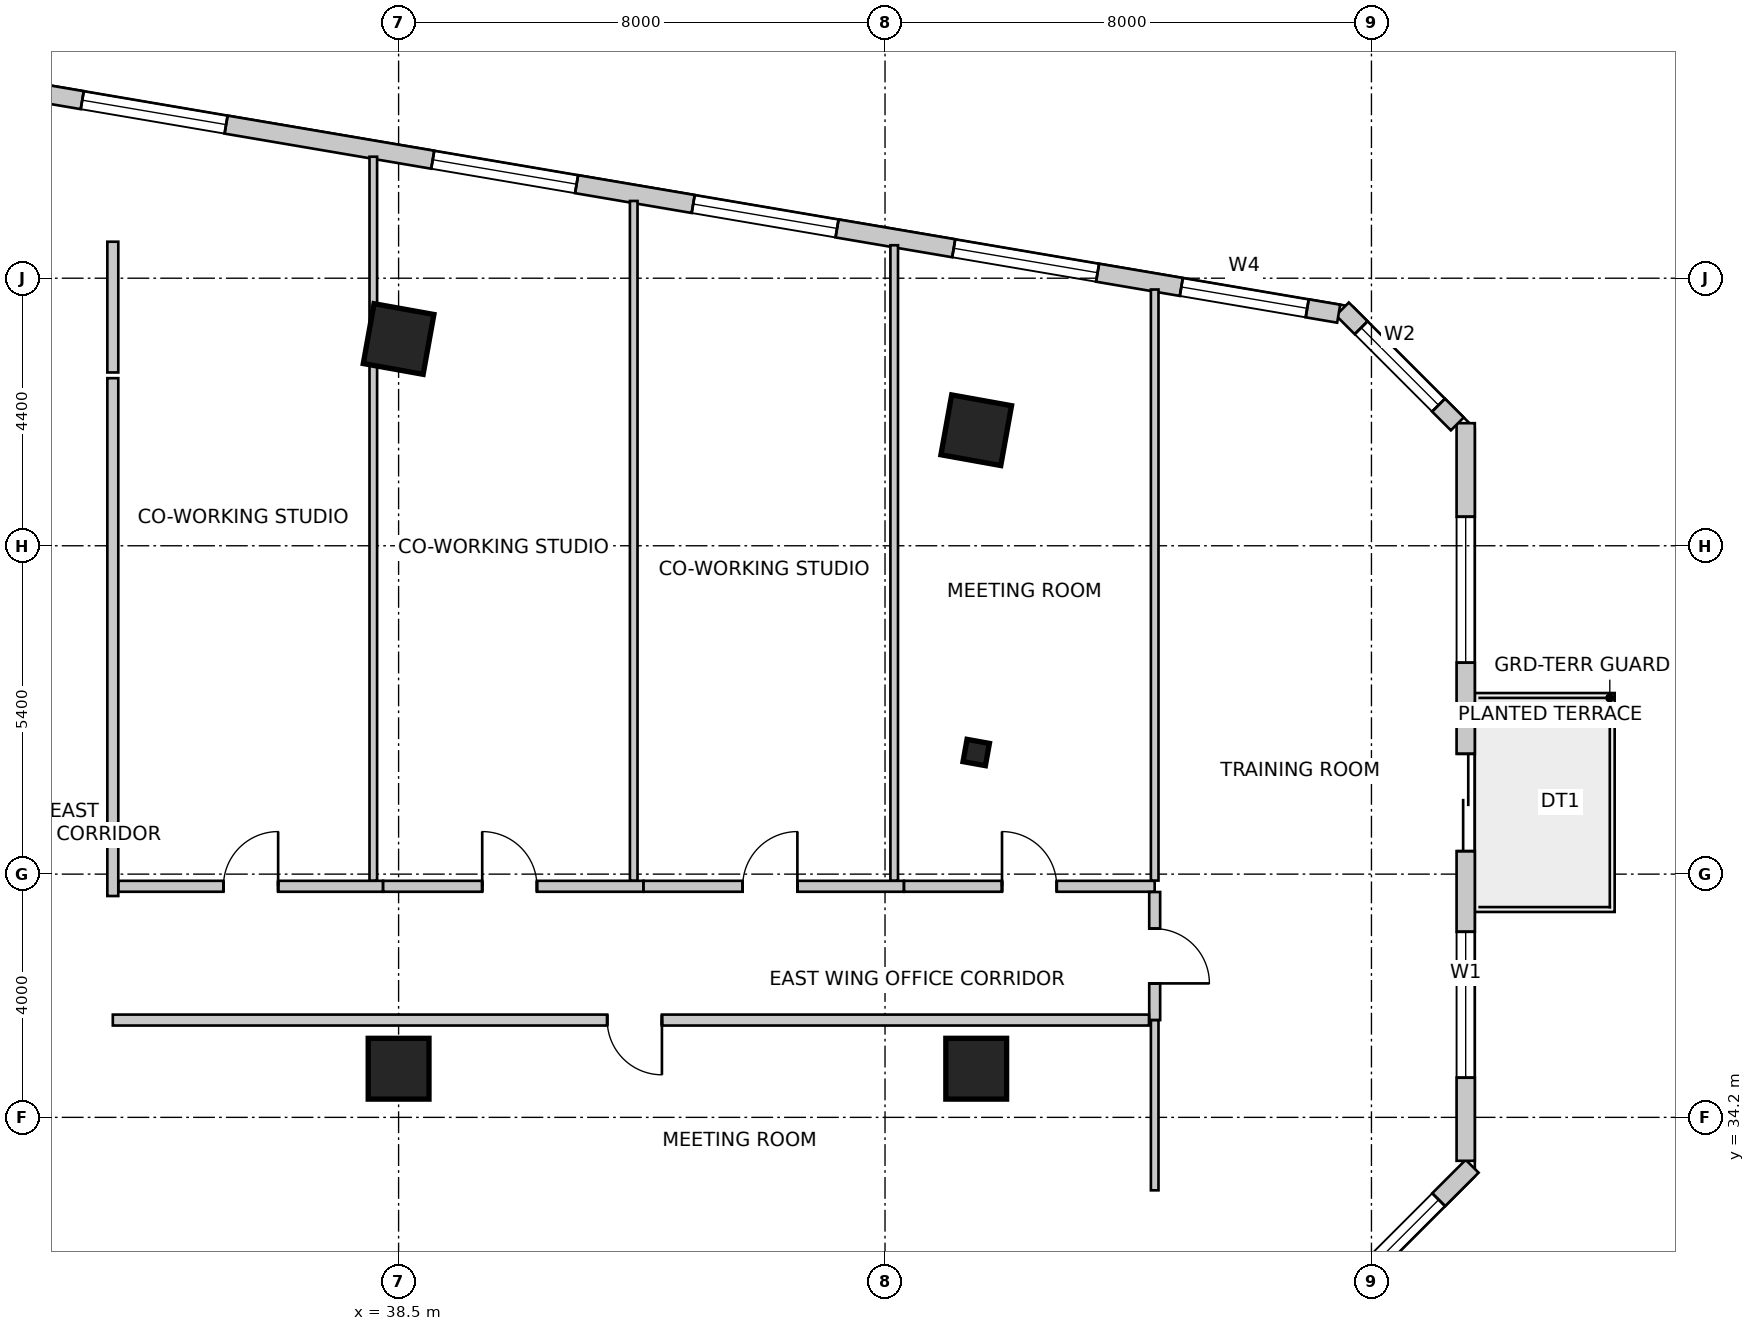
"""IFC4 building model, lengths in metres.
Left out: names, types, materials, properties, quantities, classifications, styles, units other than length and angle.
Written with IfcOpenShell. Run it as: python <this file> out.ifc"""

import sys

from ifc_helpers import new_model, si_unit, direction, frame, frame_2d, origin, origin_2d, place, context, subcontext, project, spatial, rectangle, i_section, extrude, source, transform, mapped, element, fill, save


model = new_model("IFC4")
c1 = context("Model", 3, precision=1e-05, world=origin(), true_north=direction((0.0, 1.0)))
c2 = subcontext(c1, "Body", "Model", "MODEL_VIEW")
j1 = project(units=[si_unit("LENGTHUNIT", "METRE"), si_unit("PLANEANGLEUNIT", "RADIAN")], contexts=[c1])
p1 = place(None, origin())
s1 = spatial("IfcSite", under=j1, at=p1, CompositionType="ELEMENT")
p2 = place(p1, origin())
s2 = spatial("IfcBuilding", under=s1, at=p2, CompositionType="ELEMENT")
p3 = place(p2, frame((0.0, 0.0, 79.0)))
s3 = spatial("IfcBuildingStorey", under=s2, at=p3, CompositionType="ELEMENT", Elevation=79.0)
m1 = source(origin(), c2, "Body", "SweptSolid", [
    extrude(rectangle(XDim=1.0, YDim=1.0, at=origin_2d()), origin(), (0.0, 0.0, 1.0), 4.0),
])
for number, where, z_axis, x_axis in (
    (1, (38.5, 47.0, 0.0), (0.0, 0.0, 1.0), (0.984, -0.177, 0.0)),
    (2, (48.0, 45.5, 0.0), (0.0, 0.0, 1.0), (0.984, -0.177, 0.0)),
    (3, (38.5, 35.0, 0.0), (0.0, 0.0, 1.0), (1.0, 0.0, 0.0)),
    (4, (48.0, 35.0, 0.0), (0.0, 0.0, 1.0), (1.0, 0.0, 0.0)),
):
    element("IfcColumn", number, at=place(p3, frame(where, z_axis=z_axis, x_axis=x_axis)), inside=s3, PredefinedType="COLUMN", context=c2, shape_type="MappedRepresentation", body=[
        mapped(m1, transform((0.0, 0.0, 0.0), scale=1.0)),
    ])
m2 = source(origin(), c2, "Body", "SweptSolid", [
    extrude(i_section(OverallWidth=0.374, OverallDepth=0.372, WebThickness=0.016, FlangeThickness=0.026, FilletRadius=0.015, at=origin_2d()), origin(), (0.0, 0.0, 1.0), 4.0),
])
p4 = place(p3, frame((48.0, 40.2, 0.0), z_axis=(0.0, 0.0, 1.0), x_axis=(0.984195607969, -0.17708474032, 0.0)))
e5 = element("IfcColumn", 5, at=p4, inside=s3, PredefinedType="COLUMN", context=c2, shape_type="MappedRepresentation", body=[
    mapped(m2, transform((0.0, 0.0, 0.0), scale=1.0)),
])
p5 = place(p3, frame((53.076, 30.316, 0.0), z_axis=(0.0, 0.0, 1.0), x_axis=(0.707078757535, 0.707134803727, 0.0)))
e6 = element("IfcWall", 6, at=p5, inside=s3, PredefinedType="SOLIDWALL", context=c2, shape_type="SweptSolid", body=[
    extrude(rectangle(XDim=4.356, YDim=0.3, at=frame_2d((2.178, 0.0))), origin(), (0.0, 0.0, 1.0), 3.75),
])
m3 = source(origin(), c2, "Body", "SweptSolid", [
    extrude(rectangle(XDim=2.8, YDim=2.4, at=frame_2d((1.4, 1.2))), frame((0.0, 0.16, 0.0), z_axis=(0.0, -1.0, 0.0), x_axis=(1.0, 0.0, 0.0)), (0.0, 0.0, 1.0), 0.32),
])
p6 = place(p5, frame((0.778, 0.0, 0.85)))
e7 = element("IfcOpeningElement", 7, at=p6, cuts=e6, PredefinedType="OPENING", context=c2, shape_type="MappedRepresentation", body=[
    mapped(m3, transform((0.0, 0.0, 0.0), scale=1.0)),
])
p7 = place(p3, frame((56.05, 33.485, 0.0), z_axis=(0.0, 0.0, 1.0), x_axis=(0.0, 1.0, 0.0)))
e8 = element("IfcWall", 8, at=p7, inside=s3, PredefinedType="SOLIDWALL", context=c2, shape_type="SweptSolid", body=[
    extrude(rectangle(XDim=12.131, YDim=0.3, at=frame_2d((6.065, 0.0))), origin(), (0.0, 0.0, 1.0), 3.75),
])
m4 = source(origin(), c2, "Body", "SweptSolid", [
    extrude(rectangle(XDim=1.6, YDim=2.15, at=frame_2d((0.8, 1.075))), frame((0.0, 0.16, 0.0), z_axis=(0.0, -1.0, 0.0), x_axis=(1.0, 0.0, 0.0)), (0.0, 0.0, 1.0), 0.32),
])
p8 = place(p7, frame((5.093, 0.0, 0.0)))
e9 = element("IfcOpeningElement", 9, at=p8, cuts=e8, PredefinedType="OPENING", context=c2, shape_type="MappedRepresentation", body=[
    mapped(m4, transform((0.0, 0.0, 0.0), scale=1.0)),
])
m5 = source(origin(), c2, "Body", "SweptSolid", [
    extrude(rectangle(XDim=2.4, YDim=2.2, at=frame_2d((1.2, 1.1))), frame((0.0, 0.16, 0.0), z_axis=(0.0, -1.0, 0.0), x_axis=(1.0, 0.0, 0.0)), (0.0, 0.0, 1.0), 0.32),
])
p9 = place(p7, frame((1.367, 0.0, 0.85)))
e10 = element("IfcOpeningElement", 10, at=p9, cuts=e8, PredefinedType="OPENING", context=c2, shape_type="MappedRepresentation", body=[
    mapped(m5, transform((0.0, 0.0, 0.0), scale=1.0)),
])
p10 = place(p7, frame((8.192, 0.0, 0.85)))
e11 = element("IfcOpeningElement", 11, at=p10, cuts=e8, PredefinedType="OPENING", context=c2, shape_type="MappedRepresentation", body=[
    mapped(m5, transform((0.0, 0.0, 0.0), scale=1.0)),
])
p11 = place(p3, frame((55.912, 45.604, 0.0), z_axis=(0.0, 0.0, 1.0), x_axis=(-0.707152443695, 0.707061115729, 0.0)))
e12 = element("IfcWall", 12, at=p11, inside=s3, PredefinedType="SOLIDWALL", context=c2, shape_type="SweptSolid", body=[
    extrude(rectangle(XDim=2.673, YDim=0.3, at=frame_2d((1.337, 0.0))), origin(), (0.0, 0.0, 1.0), 3.75),
])
m6 = source(origin(), c2, "Body", "SweptSolid", [
    extrude(rectangle(XDim=1.8, YDim=2.1, at=frame_2d((0.9, 1.05))), frame((0.0, 0.16, 0.0), z_axis=(0.0, -1.0, 0.0), x_axis=(1.0, 0.0, 0.0)), (0.0, 0.0, 1.0), 0.32),
])
p12 = place(p11, frame((0.437, 0.0, 0.85)))
e13 = element("IfcOpeningElement", 13, at=p12, cuts=e12, PredefinedType="OPENING", context=c2, shape_type="MappedRepresentation", body=[
    mapped(m6, transform((0.0, 0.0, 0.0), scale=1.0)),
])
p13 = place(p3, frame((53.961, 47.417, 0.0), z_axis=(0.0, 0.0, 1.0), x_axis=(-0.985865713455, 0.167537443678, 0.0)))
e14 = element("IfcWall", 14, at=p13, inside=s3, PredefinedType="SOLIDWALL", context=c2, shape_type="SweptSolid", body=[
    extrude(rectangle(XDim=32.537, YDim=0.3, at=frame_2d((16.269, 0.0))), origin(), (0.0, 0.0, 1.0), 3.75),
])
m7 = source(origin(), c2, "Body", "SweptSolid", [
    extrude(rectangle(XDim=2.1, YDim=2.0, at=frame_2d((1.05, 1.0))), frame((0.0, 0.16, 0.0), z_axis=(0.0, -1.0, 0.0), x_axis=(1.0, 0.0, 0.0)), (0.0, 0.0, 1.0), 0.32),
])
p14 = place(p13, frame((0.525, 0.0, 0.85)))
e15 = element("IfcOpeningElement", 15, at=p14, cuts=e14, PredefinedType="OPENING", context=c2, shape_type="MappedRepresentation", body=[
    mapped(m7, transform((0.0, 0.0, 0.0), scale=1.0)),
])
p15 = place(p13, frame((4.022, 0.0, 0.85)))
e16 = element("IfcOpeningElement", 16, at=p15, cuts=e14, PredefinedType="OPENING", context=c2, shape_type="MappedRepresentation", body=[
    mapped(m5, transform((0.0, 0.0, 0.0), scale=1.0)),
])
p16 = place(p13, frame((8.368, 0.0, 0.85)))
e17 = element("IfcOpeningElement", 17, at=p16, cuts=e14, PredefinedType="OPENING", context=c2, shape_type="MappedRepresentation", body=[
    mapped(m5, transform((0.0, 0.0, 0.0), scale=1.0)),
])
p17 = place(p13, frame((12.713, 0.0, 0.85)))
e18 = element("IfcOpeningElement", 18, at=p17, cuts=e14, PredefinedType="OPENING", context=c2, shape_type="MappedRepresentation", body=[
    mapped(m5, transform((0.0, 0.0, 0.0), scale=1.0)),
])
p18 = place(p13, frame((18.56, 0.0, 0.85)))
e19 = element("IfcOpeningElement", 19, at=p18, cuts=e14, PredefinedType="OPENING", context=c2, shape_type="MappedRepresentation", body=[
    mapped(m5, transform((0.0, 0.0, 0.0), scale=1.0)),
])
p19 = place(p13, frame((25.095, 0.0, 0.85)))
e20 = element("IfcOpeningElement", 20, at=p19, cuts=e14, PredefinedType="OPENING", context=c2, shape_type="MappedRepresentation", body=[
    mapped(m5, transform((0.0, 0.0, 0.0), scale=1.0)),
])
p20 = place(p13, frame((29.595, 0.0, 0.85)))
e21 = element("IfcOpeningElement", 21, at=p20, cuts=e14, PredefinedType="OPENING", context=c2, shape_type="MappedRepresentation", body=[
    mapped(m5, transform((0.0, 0.0, 0.0), scale=1.0)),
])
p21 = place(p3, frame((33.8, 48.6, 0.0), z_axis=(0.0, 0.0, 1.0), x_axis=(0.0, -1.0, 0.0)))
e22 = element("IfcWall", 22, at=p21, inside=s3, PredefinedType="PARTITIONING", context=c2, shape_type="SweptSolid", body=[
    extrude(rectangle(XDim=2.15, YDim=0.18, at=frame_2d((1.075, 0.0))), origin(), (0.0, 0.0, 1.0), 2.892),
])
p22 = place(p3, frame((33.8, 46.356, 0.0), z_axis=(0.0, 0.0, 1.0), x_axis=(0.0, -1.0, 0.0)))
e23 = element("IfcWall", 23, at=p22, inside=s3, PredefinedType="PARTITIONING", context=c2, shape_type="SweptSolid", body=[
    extrude(rectangle(XDim=8.516, YDim=0.18, at=frame_2d((4.258, 0.0))), origin(), (0.0, 0.0, 1.0), 3.279),
])
p23 = place(p3, frame((33.894, 38.0, 0.0), z_axis=(0.0, 0.0, 1.0), x_axis=(1.0, 0.0, 0.0)))
e24 = element("IfcWall", 24, at=p23, inside=s3, PredefinedType="PARTITIONING", context=c2, shape_type="SweptSolid", body=[
    extrude(rectangle(XDim=4.35, YDim=0.18, at=frame_2d((2.175, 0.0))), origin(), (0.0, 0.0, 1.0), 3.419),
])
m8 = source(origin(), c2, "Body", "SweptSolid", [
    extrude(rectangle(XDim=0.9, YDim=2.15, at=frame_2d((0.45, 1.075))), frame((0.0, 0.1, 0.0), z_axis=(0.0, -1.0, 0.0), x_axis=(1.0, 0.0, 0.0)), (0.0, 0.0, 1.0), 0.2),
])
p24 = place(p23, frame((1.725, 0.0, 0.0)))
e25 = element("IfcOpeningElement", 25, at=p24, cuts=e24, PredefinedType="OPENING", context=c2, shape_type="MappedRepresentation", body=[
    mapped(m8, transform((0.0, 0.0, 0.0), scale=1.0)),
])
p25 = place(p3, frame((38.246, 38.0, 0.0), z_axis=(0.0, 0.0, 1.0), x_axis=(1.0, 0.0, 0.0)))
e26 = element("IfcWall", 26, at=p25, inside=s3, PredefinedType="PARTITIONING", context=c2, shape_type="SweptSolid", body=[
    extrude(rectangle(XDim=4.281, YDim=0.18, at=frame_2d((2.141, 0.0))), origin(), (0.0, 0.0, 1.0), 3.125),
])
p26 = place(p25, frame((1.629, 0.0, 0.0)))
e27 = element("IfcOpeningElement", 27, at=p26, cuts=e26, PredefinedType="OPENING", context=c2, shape_type="MappedRepresentation", body=[
    mapped(m8, transform((0.0, 0.0, 0.0), scale=1.0)),
])
p27 = place(p3, frame((42.529, 38.0, 0.0), z_axis=(0.0, 0.0, 1.0), x_axis=(1.0, 0.0, 0.0)))
e28 = element("IfcWall", 28, at=p27, inside=s3, PredefinedType="PARTITIONING", context=c2, shape_type="SweptSolid", body=[
    extrude(rectangle(XDim=4.282, YDim=0.18, at=frame_2d((2.141, 0.0))), origin(), (0.0, 0.0, 1.0), 3.279),
])
p28 = place(p27, frame((1.63, 0.0, 0.0)))
e29 = element("IfcOpeningElement", 29, at=p28, cuts=e28, PredefinedType="OPENING", context=c2, shape_type="MappedRepresentation", body=[
    mapped(m8, transform((0.0, 0.0, 0.0), scale=1.0)),
])
p29 = place(p3, frame((46.813, 38.0, 0.0), z_axis=(0.0, 0.0, 1.0), x_axis=(1.0, 0.0, 0.0)))
e30 = element("IfcWall", 30, at=p29, inside=s3, PredefinedType="PARTITIONING", context=c2, shape_type="SweptSolid", body=[
    extrude(rectangle(XDim=4.122, YDim=0.18, at=frame_2d((2.061, 0.0))), origin(), (0.0, 0.0, 1.0), 3.125),
])
p30 = place(p29, frame((1.611, 0.0, 0.0)))
e31 = element("IfcOpeningElement", 31, at=p30, cuts=e30, PredefinedType="OPENING", context=c2, shape_type="MappedRepresentation", body=[
    mapped(m8, transform((0.0, 0.0, 0.0), scale=1.0)),
])
p31 = place(p3, frame((50.935, 37.906, 0.0), z_axis=(0.0, 0.0, 1.0), x_axis=(0.0, -1.0, 0.0)))
e32 = element("IfcWall", 32, at=p31, inside=s3, PredefinedType="PARTITIONING", context=c2, shape_type="SweptSolid", body=[
    extrude(rectangle(XDim=2.106, YDim=0.18, at=frame_2d((1.053, 0.0))), origin(), (0.0, 0.0, 1.0), 3.75),
])
p32 = place(p31, frame((0.603, 0.0, 0.0)))
e33 = element("IfcOpeningElement", 33, at=p32, cuts=e32, PredefinedType="OPENING", context=c2, shape_type="MappedRepresentation", body=[
    mapped(m8, transform((0.0, 0.0, 0.0), scale=1.0)),
])
p33 = place(p3, frame((50.841, 35.8, 0.0), z_axis=(0.0, 0.0, 1.0), x_axis=(-1.0, 0.0, 0.0)))
e34 = element("IfcWall", 34, at=p33, inside=s3, PredefinedType="PARTITIONING", context=c2, shape_type="SweptSolid", body=[
    extrude(rectangle(XDim=17.041, YDim=0.18, at=frame_2d((8.521, 0.0))), origin(), (0.0, 0.0, 1.0), 3.125),
])
p34 = place(p33, frame((8.01, 0.0, 0.0)))
e35 = element("IfcOpeningElement", 35, at=p34, cuts=e34, PredefinedType="OPENING", context=c2, shape_type="MappedRepresentation", body=[
    mapped(m8, transform((0.0, 0.0, 0.0), scale=1.0)),
])
p35 = place(p3, frame((38.084, 49.998, 0.0), z_axis=(0.0, 0.0, 1.0), x_axis=(0.0, -1.0, 0.0)))
e36 = element("IfcWall", 36, at=p35, inside=s3, PredefinedType="PARTITIONING", context=c2, shape_type="SweptSolid", body=[
    extrude(rectangle(XDim=11.904, YDim=0.125, at=frame_2d((5.952, 0.0))), origin(), (0.0, 0.0, 1.0), 2.892),
])
p36 = place(p3, frame((42.367, 49.27, 0.0), z_axis=(0.0, 0.0, 1.0), x_axis=(0.0, -1.0, 0.0)))
e37 = element("IfcWall", 37, at=p36, inside=s3, PredefinedType="PARTITIONING", context=c2, shape_type="SweptSolid", body=[
    extrude(rectangle(XDim=11.176, YDim=0.125, at=frame_2d((5.588, 0.0))), origin(), (0.0, 0.0, 1.0), 2.892),
])
p37 = place(p3, frame((46.651, 48.542, 0.0), z_axis=(0.0, 0.0, 1.0), x_axis=(0.0, -1.0, 0.0)))
e38 = element("IfcWall", 38, at=p37, inside=s3, PredefinedType="PARTITIONING", context=c2, shape_type="SweptSolid", body=[
    extrude(rectangle(XDim=10.448, YDim=0.125, at=frame_2d((5.224, 0.0))), origin(), (0.0, 0.0, 1.0), 2.892),
])
p38 = place(p3, frame((50.935, 47.814, 0.0), z_axis=(0.0, 0.0, 1.0), x_axis=(0.0, -1.0, 0.0)))
e39 = element("IfcWall", 39, at=p38, inside=s3, PredefinedType="PARTITIONING", context=c2, shape_type="SweptSolid", body=[
    extrude(rectangle(XDim=9.72, YDim=0.125, at=frame_2d((4.86, 0.0))), origin(), (0.0, 0.0, 1.0), 3.75),
])
p39 = place(p3, frame((50.935, 33.0, 0.0), z_axis=(0.0, 0.0, 1.0), x_axis=(0.0, 1.0, 0.0)))
e40 = element("IfcWall", 40, at=p39, inside=s3, PredefinedType="PARTITIONING", context=c2, shape_type="SweptSolid", body=[
    extrude(rectangle(XDim=2.798, YDim=0.125, at=frame_2d((1.399, 0.0))), origin(), (0.0, 0.0, 1.0), 3.75),
])
m9 = source(origin(), c2, "Body", "SweptSolid", [
    extrude(rectangle(XDim=2.8, YDim=2.4, at=frame_2d((1.4, 1.2))), frame((0.0, -0.015, 0.0), z_axis=(0.0, -1.0, 0.0), x_axis=(1.0, 0.0, 0.0)), (0.0, 0.0, 1.0), 0.06),
])
p40 = place(p6, origin())
e41 = element("IfcWindow", 41, at=p40, inside=s3, PartitioningType="SINGLE_PANEL", PredefinedType="WINDOW", context=c2, shape_type="MappedRepresentation", body=[
    mapped(m9, transform((0.0, 0.0, 0.0), scale=1.0)),
])
fill(e7, e41)
m10 = source(origin(), c2, "Body", "SweptSolid", [
    extrude(rectangle(XDim=1.6, YDim=2.15, at=frame_2d((0.8, 1.075))), frame((0.0, 0.025, 0.0), z_axis=(0.0, -1.0, 0.0), x_axis=(1.0, 0.0, 0.0)), (0.0, 0.0, 1.0), 0.05),
])
p41 = place(p8, origin())
e42 = element("IfcDoor", 42, at=p41, inside=s3, OperationType="DOUBLE_DOOR_SLIDING", PredefinedType="DOOR", context=c2, shape_type="MappedRepresentation", body=[
    mapped(m10, transform((0.0, 0.0, 0.0), scale=1.0)),
])
fill(e9, e42)
m11 = source(origin(), c2, "Body", "SweptSolid", [
    extrude(rectangle(XDim=2.4, YDim=2.2, at=frame_2d((1.2, 1.1))), frame((0.0, -0.015, 0.0), z_axis=(0.0, -1.0, 0.0), x_axis=(1.0, 0.0, 0.0)), (0.0, 0.0, 1.0), 0.06),
])
p42 = place(p9, origin())
e43 = element("IfcWindow", 43, at=p42, inside=s3, PartitioningType="SINGLE_PANEL", PredefinedType="WINDOW", context=c2, shape_type="MappedRepresentation", body=[
    mapped(m11, transform((0.0, 0.0, 0.0), scale=1.0)),
])
fill(e10, e43)
p43 = place(p10, origin())
e44 = element("IfcWindow", 44, at=p43, inside=s3, PartitioningType="SINGLE_PANEL", PredefinedType="WINDOW", context=c2, shape_type="MappedRepresentation", body=[
    mapped(m11, transform((0.0, 0.0, 0.0), scale=1.0)),
])
fill(e11, e44)
m12 = source(origin(), c2, "Body", "SweptSolid", [
    extrude(rectangle(XDim=1.8, YDim=2.1, at=frame_2d((0.9, 1.05))), frame((0.0, -0.015, 0.0), z_axis=(0.0, -1.0, 0.0), x_axis=(1.0, 0.0, 0.0)), (0.0, 0.0, 1.0), 0.06),
])
p44 = place(p12, origin())
e45 = element("IfcWindow", 45, at=p44, inside=s3, PartitioningType="SINGLE_PANEL", PredefinedType="WINDOW", context=c2, shape_type="MappedRepresentation", body=[
    mapped(m12, transform((0.0, 0.0, 0.0), scale=1.0)),
])
fill(e13, e45)
m13 = source(origin(), c2, "Body", "SweptSolid", [
    extrude(rectangle(XDim=2.1, YDim=2.0, at=frame_2d((1.05, 1.0))), frame((0.0, -0.015, 0.0), z_axis=(0.0, -1.0, 0.0), x_axis=(1.0, 0.0, 0.0)), (0.0, 0.0, 1.0), 0.06),
])
p45 = place(p14, origin())
e46 = element("IfcWindow", 46, at=p45, inside=s3, PartitioningType="SINGLE_PANEL", PredefinedType="WINDOW", context=c2, shape_type="MappedRepresentation", body=[
    mapped(m13, transform((0.0, 0.0, 0.0), scale=1.0)),
])
fill(e15, e46)
p46 = place(p15, origin())
e47 = element("IfcWindow", 47, at=p46, inside=s3, PartitioningType="SINGLE_PANEL", PredefinedType="WINDOW", context=c2, shape_type="MappedRepresentation", body=[
    mapped(m11, transform((0.0, 0.0, 0.0), scale=1.0)),
])
fill(e16, e47)
p47 = place(p16, origin())
e48 = element("IfcWindow", 48, at=p47, inside=s3, PartitioningType="SINGLE_PANEL", PredefinedType="WINDOW", context=c2, shape_type="MappedRepresentation", body=[
    mapped(m11, transform((0.0, 0.0, 0.0), scale=1.0)),
])
fill(e17, e48)
p48 = place(p17, origin())
e49 = element("IfcWindow", 49, at=p48, inside=s3, PartitioningType="SINGLE_PANEL", PredefinedType="WINDOW", context=c2, shape_type="MappedRepresentation", body=[
    mapped(m11, transform((0.0, 0.0, 0.0), scale=1.0)),
])
fill(e18, e49)
p49 = place(p18, origin())
e50 = element("IfcWindow", 50, at=p49, inside=s3, PartitioningType="SINGLE_PANEL", PredefinedType="WINDOW", context=c2, shape_type="MappedRepresentation", body=[
    mapped(m11, transform((0.0, 0.0, 0.0), scale=1.0)),
])
fill(e19, e50)
m14 = source(origin(), c2, "Body", "SweptSolid", [
    extrude(rectangle(XDim=0.9, YDim=2.15, at=frame_2d((0.45, 1.075))), frame((0.0, 0.025, 0.0), z_axis=(0.0, -1.0, 0.0), x_axis=(1.0, 0.0, 0.0)), (0.0, 0.0, 1.0), 0.05),
])
p50 = place(p24, origin())
e51 = element("IfcDoor", 51, at=p50, inside=s3, OperationType="SINGLE_SWING_RIGHT", PredefinedType="DOOR", context=c2, shape_type="MappedRepresentation", body=[
    mapped(m14, transform((0.0, 0.0, 0.0), scale=1.0)),
])
fill(e25, e51)
p51 = place(p26, origin())
e52 = element("IfcDoor", 52, at=p51, inside=s3, OperationType="SINGLE_SWING_LEFT", PredefinedType="DOOR", context=c2, shape_type="MappedRepresentation", body=[
    mapped(m14, transform((0.0, 0.0, 0.0), scale=1.0)),
])
fill(e27, e52)
p52 = place(p28, origin())
e53 = element("IfcDoor", 53, at=p52, inside=s3, OperationType="SINGLE_SWING_RIGHT", PredefinedType="DOOR", context=c2, shape_type="MappedRepresentation", body=[
    mapped(m14, transform((0.0, 0.0, 0.0), scale=1.0)),
])
fill(e29, e53)
p53 = place(p30, origin())
e54 = element("IfcDoor", 54, at=p53, inside=s3, OperationType="SINGLE_SWING_LEFT", PredefinedType="DOOR", context=c2, shape_type="MappedRepresentation", body=[
    mapped(m14, transform((0.0, 0.0, 0.0), scale=1.0)),
])
fill(e31, e54)
p54 = place(p32, origin())
e55 = element("IfcDoor", 55, at=p54, inside=s3, OperationType="SINGLE_SWING_RIGHT", PredefinedType="DOOR", context=c2, shape_type="MappedRepresentation", body=[
    mapped(m14, transform((0.0, 0.0, 0.0), scale=1.0)),
])
fill(e33, e55)
p55 = place(p34, origin())
e56 = element("IfcDoor", 56, at=p55, inside=s3, OperationType="SINGLE_SWING_LEFT", PredefinedType="DOOR", context=c2, shape_type="MappedRepresentation", body=[
    mapped(m14, transform((0.0, 0.0, 0.0), scale=1.0)),
])
fill(e35, e56)
save(model, sys.argv[1])
